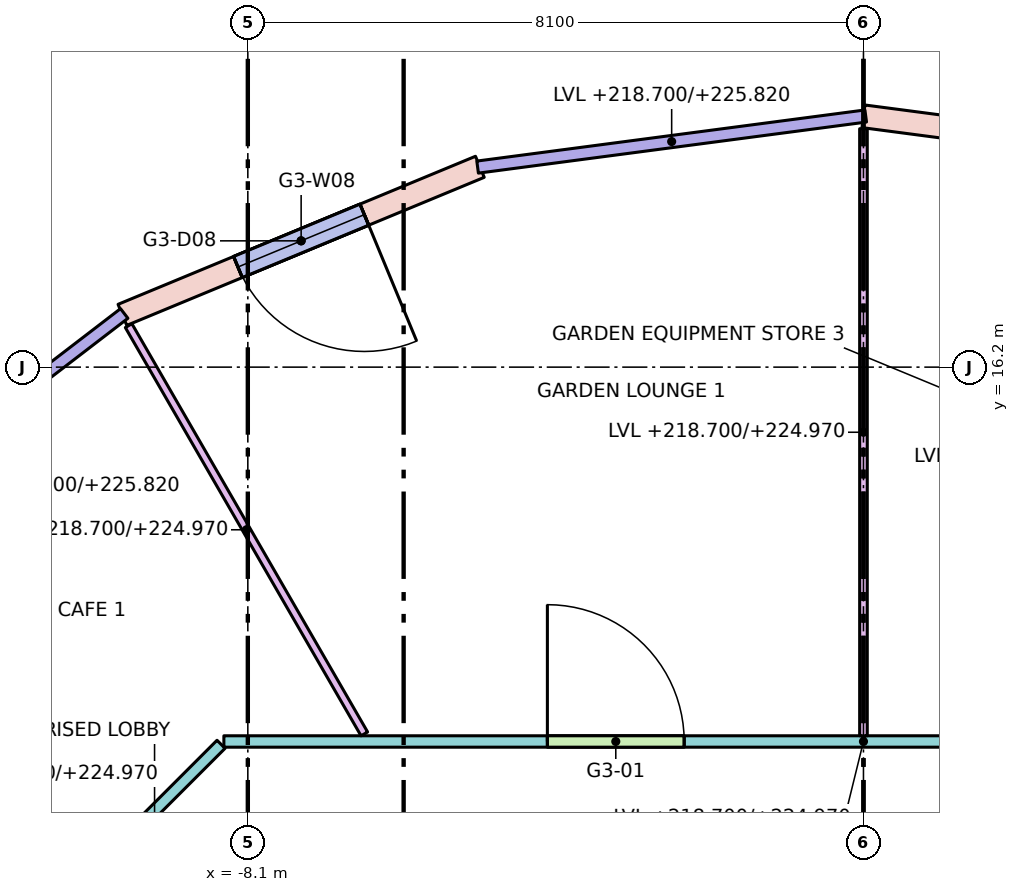
"""IFC4 building model, lengths in metres.
Left out: names, types, materials, properties, quantities, classifications, styles, units other than length and angle.
Written with IfcOpenShell. Run it as: python <this file> out.ifc"""

import sys

from ifc_helpers import new_model, si_unit, direction, frame, frame_2d, origin, place, context, subcontext, project, spatial, rectangle, extrude, element, fill, save


model = new_model("IFC4")
c1 = context("Model", 3, precision=1e-05, world=origin(), true_north=direction((0.0, 1.0)))
c2 = subcontext(c1, "Body", "Model", "MODEL_VIEW")
j1 = project(units=[si_unit("LENGTHUNIT", "METRE"), si_unit("PLANEANGLEUNIT", "RADIAN")], contexts=[c1])
p1 = place(None, origin())
s1 = spatial("IfcSite", under=j1, at=p1, CompositionType="ELEMENT")
p2 = place(p1, origin())
s2 = spatial("IfcBuilding", under=s1, at=p2, CompositionType="ELEMENT")
p3 = place(p2, frame((0.0, 0.0, 218.7)))
s3 = spatial("IfcBuildingStorey", under=s2, at=p3, CompositionType="ELEMENT", Elevation=218.7)
p4 = place(p3, frame((5.047, 18.836, 0.0), z_axis=(0.0, 0.0, 1.0), x_axis=(-0.99144890792, 0.130495451964, 0.0)))
e1 = element("IfcWall", 1, at=p4, inside=s3, PredefinedType="STANDARD", context=c2, shape_type="SweptSolid", body=[
    extrude(rectangle(XDim=5.091, YDim=0.3, at=frame_2d((2.545, 0.0))), origin(), (0.0, 0.0, 1.0), 7.12),
])
p5 = place(p4, frame((1.645, 0.0, 0.0)))
e2 = element("IfcOpeningElement", 2, at=p5, cuts=e1, PredefinedType="OPENING", context=c2, shape_type="SweptSolid", body=[
    extrude(rectangle(XDim=1.8, YDim=2.4, at=frame_2d((0.9, 1.2))), frame((0.0, 0.16, 0.0), z_axis=(0.0, -1.0, 0.0), x_axis=(1.0, 0.0, 0.0)), (0.0, 0.0, 1.0), 0.32),
])
p6 = place(p4, frame((1.645, 0.0, 2.8)))
e3 = element("IfcOpeningElement", 3, at=p6, cuts=e1, PredefinedType="OPENING", context=c2, shape_type="SweptSolid", body=[
    extrude(rectangle(XDim=1.8, YDim=4.1, at=frame_2d((0.9, 2.05))), frame((0.0, 0.16, 0.0), z_axis=(0.0, -1.0, 0.0), x_axis=(1.0, 0.0, 0.0)), (0.0, 0.0, 1.0), 0.32),
])
p7 = place(p3, frame((-5.047, 18.836, 0.0), z_axis=(0.0, 0.0, 1.0), x_axis=(-0.923862504675, -0.382724538613, 0.0)))
e4 = element("IfcWall", 4, at=p7, inside=s3, PredefinedType="STANDARD", context=c2, shape_type="SweptSolid", body=[
    extrude(rectangle(XDim=5.091, YDim=0.3, at=frame_2d((2.545, 0.0))), origin(), (0.0, 0.0, 1.0), 7.12),
])
p8 = place(p7, frame((1.645, 0.0, 0.0)))
e5 = element("IfcOpeningElement", 5, at=p8, cuts=e4, PredefinedType="OPENING", context=c2, shape_type="SweptSolid", body=[
    extrude(rectangle(XDim=1.8, YDim=2.4, at=frame_2d((0.9, 1.2))), frame((0.0, 0.16, 0.0), z_axis=(0.0, -1.0, 0.0), x_axis=(1.0, 0.0, 0.0)), (0.0, 0.0, 1.0), 0.32),
])
p9 = place(p7, frame((1.645, 0.0, 2.8)))
e6 = element("IfcOpeningElement", 6, at=p9, cuts=e4, PredefinedType="OPENING", context=c2, shape_type="SweptSolid", body=[
    extrude(rectangle(XDim=1.8, YDim=4.1, at=frame_2d((0.9, 2.05))), frame((0.0, 0.16, 0.0), z_axis=(0.0, -1.0, 0.0), x_axis=(1.0, 0.0, 0.0)), (0.0, 0.0, 1.0), 0.32),
])
p10 = place(p3, frame((-13.238, 6.452, 0.0), z_axis=(0.0, 0.0, 1.0), x_axis=(0.707106781187, 0.707106781187, 0.0)))
e7 = element("IfcWall", 7, at=p10, inside=s3, PredefinedType="PARTITIONING", context=c2, shape_type="SweptSolid", body=[
    extrude(rectangle(XDim=6.768, YDim=0.15, at=frame_2d((3.384, 0.0))), origin(), (0.0, 0.0, 1.0), 6.27),
])
p11 = place(p10, frame((2.992, 0.0, 0.0)))
e8 = element("IfcOpeningElement", 8, at=p11, cuts=e7, PredefinedType="OPENING", context=c2, shape_type="SweptSolid", body=[
    extrude(rectangle(XDim=1.8, YDim=2.1, at=frame_2d((0.9, 1.05))), frame((0.0, 0.085, 0.0), z_axis=(0.0, -1.0, 0.0), x_axis=(1.0, 0.0, 0.0)), (0.0, 0.0, 1.0), 0.17),
])
p12 = place(p3, frame((-8.415, 11.275, 0.0), z_axis=(0.0, 0.0, 1.0), x_axis=(1.0, 0.0, 0.0)))
e9 = element("IfcWall", 9, at=p12, inside=s3, PredefinedType="PARTITIONING", context=c2, shape_type="SweptSolid", body=[
    extrude(rectangle(XDim=16.83, YDim=0.15, at=frame_2d((8.415, 0.0))), origin(), (0.0, 0.0, 1.0), 6.27),
])
p13 = place(p12, frame((4.256, 0.0, 0.0)))
e10 = element("IfcOpeningElement", 10, at=p13, cuts=e9, PredefinedType="OPENING", context=c2, shape_type="SweptSolid", body=[
    extrude(rectangle(XDim=1.8, YDim=2.1, at=frame_2d((0.9, 1.05))), frame((0.0, 0.085, 0.0), z_axis=(0.0, -1.0, 0.0), x_axis=(1.0, 0.0, 0.0)), (0.0, 0.0, 1.0), 0.17),
])
p14 = place(p12, frame((12.734, 0.0, 0.0)))
e11 = element("IfcOpeningElement", 11, at=p14, cuts=e9, PredefinedType="OPENING", context=c2, shape_type="SweptSolid", body=[
    extrude(rectangle(XDim=0.9, YDim=2.1, at=frame_2d((0.45, 1.05))), frame((0.0, 0.085, 0.0), z_axis=(0.0, -1.0, 0.0), x_axis=(1.0, 0.0, 0.0)), (0.0, 0.0, 1.0), 0.17),
])
p15 = place(p12, frame((9.477, 0.0, 0.0)))
e12 = element("IfcOpeningElement", 12, at=p15, cuts=e9, PredefinedType="OPENING", context=c2, shape_type="SweptSolid", body=[
    extrude(rectangle(XDim=0.9, YDim=2.1, at=frame_2d((0.45, 1.05))), frame((0.0, 0.085, 0.0), z_axis=(0.0, -1.0, 0.0), x_axis=(1.0, 0.0, 0.0)), (0.0, 0.0, 1.0), 0.17),
])
p16 = place(p3, frame((0.0, 11.35, 0.0), z_axis=(0.0, 0.0, 1.0), x_axis=(0.0, 1.0, 0.0)))
e13 = element("IfcWall", 13, at=p16, inside=s3, PredefinedType="PARTITIONING", context=c2, shape_type="SweptSolid", body=[
    extrude(rectangle(XDim=7.987, YDim=0.1, at=frame_2d((3.993, 0.0))), origin(), (0.0, 0.0, 1.0), 6.27),
])
p17 = place(p3, frame((-6.567, 11.375, 0.0), z_axis=(0.0, 0.0, 1.0), x_axis=(-0.500004114527, 0.866023028248, 0.0)))
e14 = element("IfcWall", 14, at=p17, inside=s3, PredefinedType="PARTITIONING", context=c2, shape_type="SweptSolid", body=[
    extrude(rectangle(XDim=6.203, YDim=0.1, at=frame_2d((3.101, 0.0))), origin(), (0.0, 0.0, 1.0), 6.27),
])
p18 = place(p8, origin())
e15 = element("IfcDoor", 15, at=p18, inside=s3, OperationType="SINGLE_SWING_LEFT", PredefinedType="DOOR", context=c2, shape_type="SweptSolid", body=[
    extrude(rectangle(XDim=1.8, YDim=2.4, at=frame_2d((0.9, 1.2))), frame((0.0, 0.025, 0.0), z_axis=(0.0, -1.0, 0.0), x_axis=(1.0, 0.0, 0.0)), (0.0, 0.0, 1.0), 0.05),
])
fill(e5, e15)
p19 = place(p9, origin())
e16 = element("IfcWindow", 16, at=p19, inside=s3, PartitioningType="SINGLE_PANEL", PredefinedType="WINDOW", context=c2, shape_type="SweptSolid", body=[
    extrude(rectangle(XDim=1.8, YDim=4.1, at=frame_2d((0.9, 2.05))), frame((0.0, 0.03, 0.0), z_axis=(0.0, -1.0, 0.0), x_axis=(1.0, 0.0, 0.0)), (0.0, 0.0, 1.0), 0.06),
])
fill(e6, e16)
p20 = place(p13, origin())
e17 = element("IfcDoor", 17, at=p20, inside=s3, OperationType="DOUBLE_DOOR_SINGLE_SWING", PredefinedType="DOOR", context=c2, shape_type="SweptSolid", body=[
    extrude(rectangle(XDim=1.8, YDim=2.1, at=frame_2d((0.9, 1.05))), frame((0.0, 0.025, 0.0), z_axis=(0.0, -1.0, 0.0), x_axis=(1.0, 0.0, 0.0)), (0.0, 0.0, 1.0), 0.05),
])
fill(e10, e17)
save(model, sys.argv[1])
